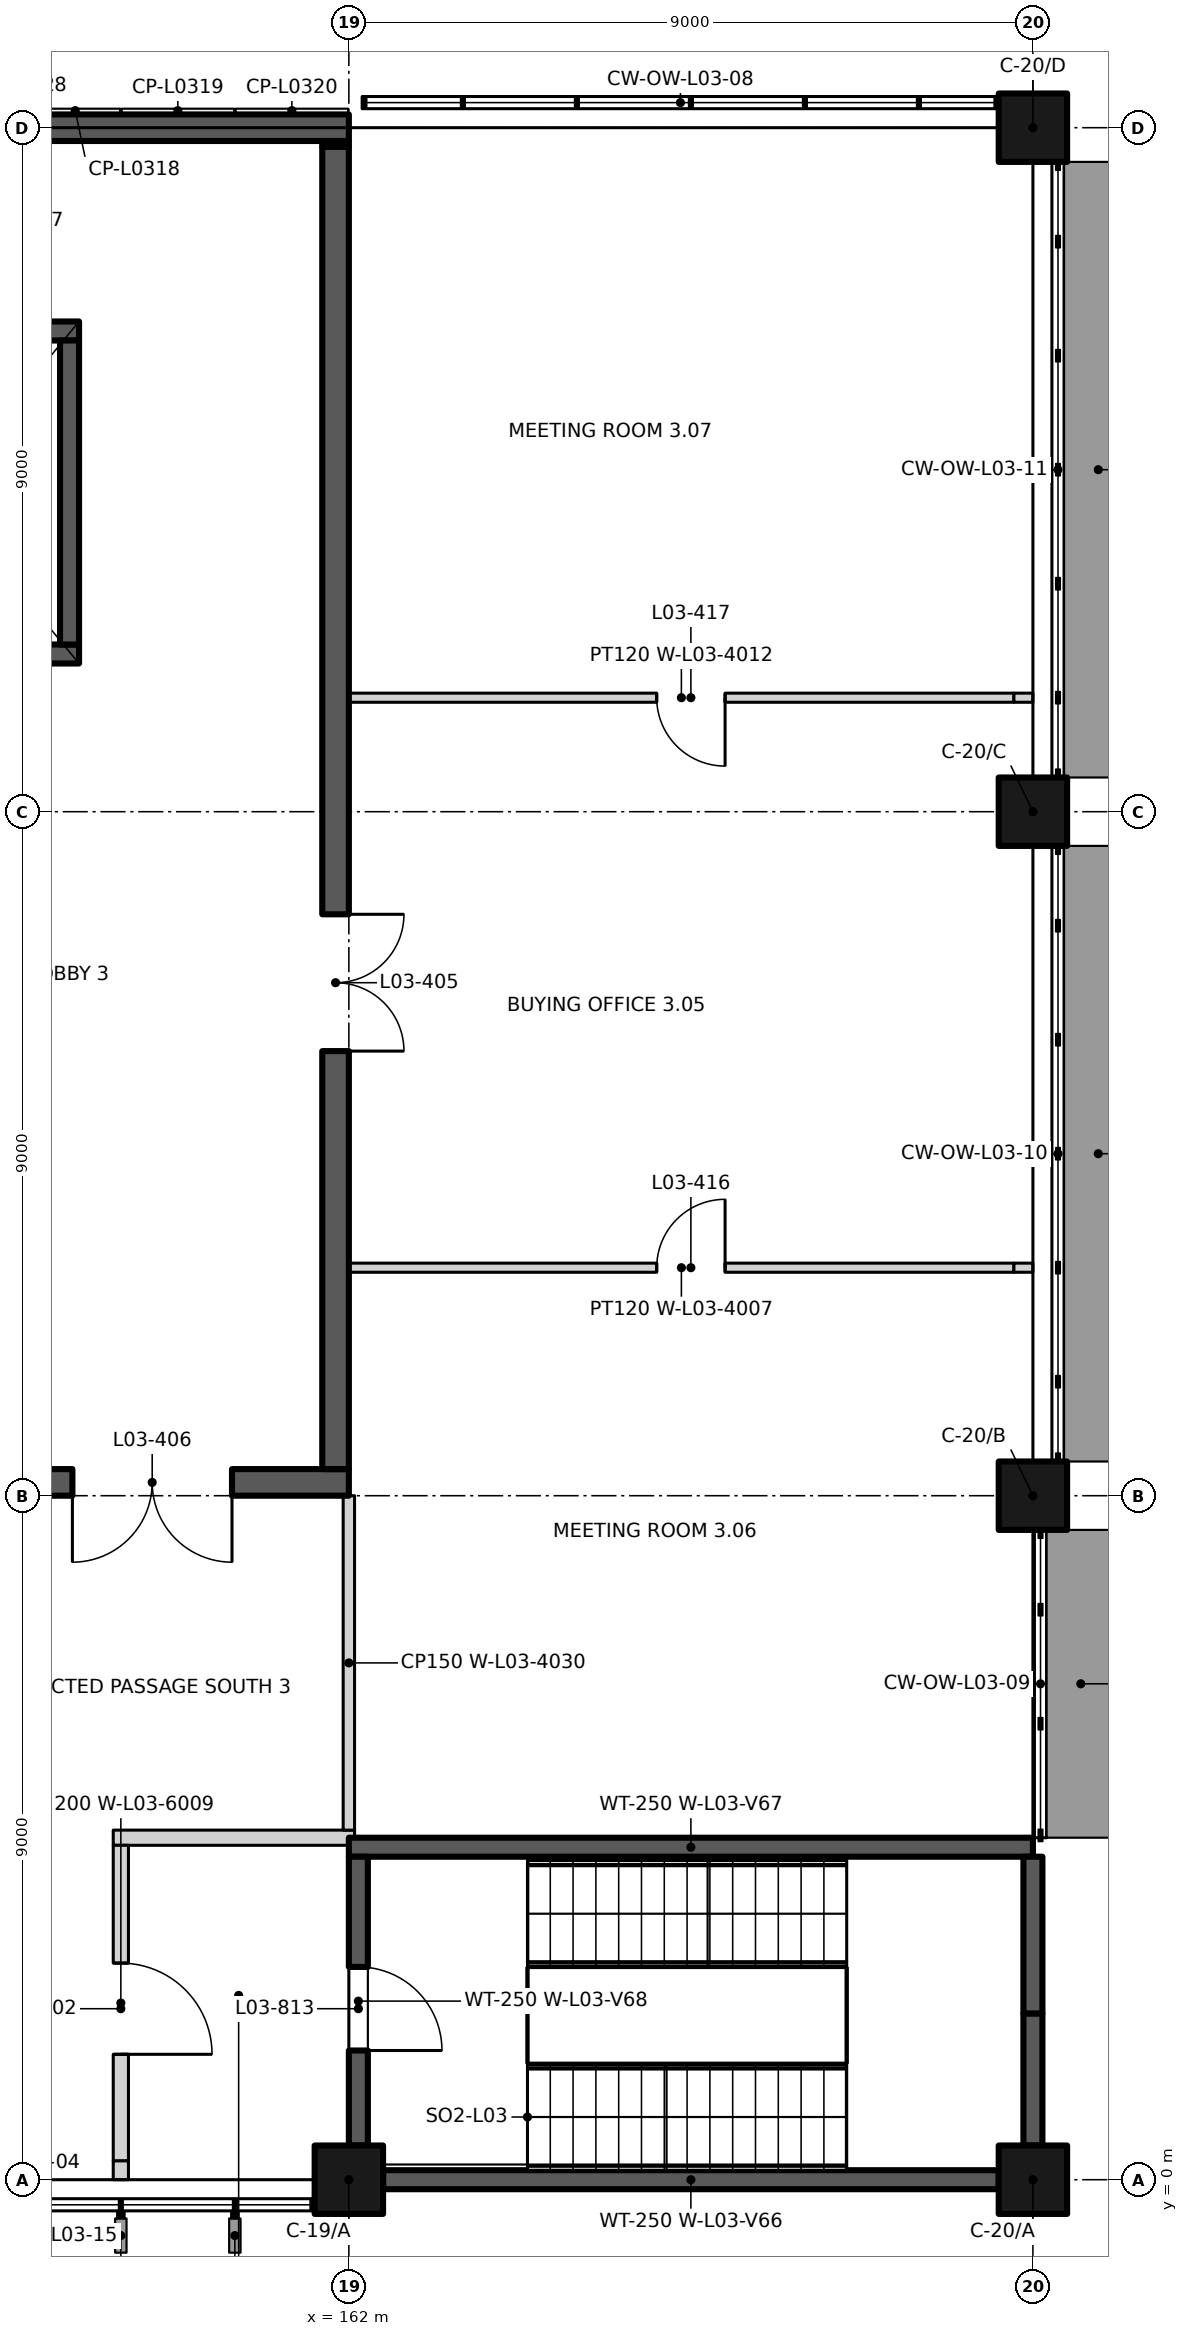
"""IFC4 building model, lengths in metres.
Left out: names, types, materials, properties, quantities, classifications, styles, units other than length and angle.
Written with IfcOpenShell. Run it as: python <this file> out.ifc"""

import sys

from ifc_helpers import new_model, si_unit, direction, frame, frame_2d, origin, origin_2d, place, context, subcontext, project, spatial, rectangle, extrude, element, fill, save


model = new_model("IFC4")
c1 = context("Model", 3, precision=1e-05, world=origin(), true_north=direction((0.0, 1.0)))
c2 = subcontext(c1, "Body", "Model", "MODEL_VIEW")
j1 = project(units=[si_unit("LENGTHUNIT", "METRE"), si_unit("PLANEANGLEUNIT", "RADIAN")], contexts=[c1])
p1 = place(None, origin())
s1 = spatial("IfcSite", under=j1, at=p1, CompositionType="ELEMENT")
p2 = place(p1, origin())
s2 = spatial("IfcBuilding", under=s1, at=p2, CompositionType="ELEMENT")
p3 = place(p2, frame((0.0, 0.0, 15.0)))
s3 = spatial("IfcBuildingStorey", under=s2, at=p3, CompositionType="ELEMENT", Elevation=15.0)
for number, where, z_axis, x_axis in (
    (1, (162.0, 0.0, 0.0), (0.0, 0.0, 1.0), (1.0, 0.0, 0.0)),
    (2, (171.0, 0.0, 0.0), (0.0, 0.0, 1.0), (1.0, 0.0, 0.0)),
    (3, (171.0, 9.0, 0.0), (0.0, 0.0, 1.0), (1.0, 0.0, 0.0)),
    (4, (171.0, 18.0, 0.0), (0.0, 0.0, 1.0), (1.0, 0.0, 0.0)),
    (5, (171.0, 27.0, 0.0), (0.0, 0.0, 1.0), (1.0, 0.0, 0.0)),
):
    element("IfcColumn", number, at=place(p3, frame(where, z_axis=z_axis, x_axis=x_axis)), inside=s3, PredefinedType="COLUMN", context=c2, shape_type="SweptSolid", body=[
        extrude(rectangle(XDim=0.9, YDim=0.9, at=origin_2d()), origin(), (0.0, 0.0, 1.0), 4.5),
    ])
p4 = place(p3, frame((162.45, 0.0, 0.0), z_axis=(0.0, 0.0, 1.0), x_axis=(1.0, 0.0, 0.0)))
e6 = element("IfcWall", 6, at=p4, inside=s3, PredefinedType="SHEAR", context=c2, shape_type="SweptSolid", body=[
    extrude(rectangle(XDim=8.1, YDim=0.25, at=frame_2d((4.05, 0.0))), origin(), (0.0, 0.0, 1.0), 4.5),
])
p5 = place(p3, frame((162.0, 4.375, 0.0), z_axis=(0.0, 0.0, 1.0), x_axis=(1.0, 0.0, 0.0)))
e7 = element("IfcWall", 7, at=p5, inside=s3, PredefinedType="SHEAR", context=c2, shape_type="SweptSolid", body=[
    extrude(rectangle(XDim=9.0, YDim=0.25, at=frame_2d((4.5, 0.0))), origin(), (0.0, 0.0, 1.0), 4.5),
])
p6 = place(p3, frame((162.125, 0.45, 0.0), z_axis=(0.0, 0.0, 1.0), x_axis=(0.0, 1.0, 0.0)))
e8 = element("IfcWall", 8, at=p6, inside=s3, PredefinedType="SHEAR", context=c2, shape_type="SweptSolid", body=[
    extrude(rectangle(XDim=3.8, YDim=0.25, at=frame_2d((1.9, 0.0))), origin(), (0.0, 0.0, 1.0), 4.5),
])
p7 = place(p6, frame((2.35, 0.0, 0.0), z_axis=(0.0, 0.0, 1.0), x_axis=(-1.0, 0.0, 0.0)))
e9 = element("IfcOpeningElement", 9, at=p7, cuts=e8, PredefinedType="OPENING", context=c2, shape_type="SweptSolid", body=[
    extrude(rectangle(XDim=1.1, YDim=2.1, at=frame_2d((0.55, 1.05))), frame((0.0, 0.135, 0.0), z_axis=(0.0, -1.0, 0.0), x_axis=(1.0, 0.0, 0.0)), (0.0, 0.0, 1.0), 0.27),
])
p8 = place(p3, frame((171.0, 0.45, 0.0), z_axis=(0.0, 0.0, 1.0), x_axis=(0.0, 1.0, 0.0)))
e10 = element("IfcWall", 10, at=p8, inside=s3, PredefinedType="SHEAR", context=c2, shape_type="SweptSolid", body=[
    extrude(rectangle(XDim=1.738, YDim=0.25, at=frame_2d((0.869, 0.0))), origin(), (0.0, 0.0, 1.0), 4.5),
])
p9 = place(p3, frame((171.0, 2.188, 0.0), z_axis=(0.0, 0.0, 1.0), x_axis=(0.0, 1.0, 0.0)))
e11 = element("IfcWall", 11, at=p9, inside=s3, PredefinedType="SHEAR", context=c2, shape_type="SweptSolid", body=[
    extrude(rectangle(XDim=2.062, YDim=0.25, at=frame_2d((1.031, 0.0))), origin(), (0.0, 0.0, 1.0), 4.5),
])
p10 = place(p3, frame((154.75, 20.075, 0.0), z_axis=(0.0, 0.0, 1.0), x_axis=(1.0, 0.0, 0.0)))
e12 = element("IfcWall", 12, at=p10, inside=s3, PredefinedType="SHEAR", context=c2, shape_type="SweptSolid", body=[
    extrude(rectangle(XDim=3.7, YDim=0.25, at=frame_2d((1.85, 0.0))), origin(), (0.0, 0.0, 1.0), 4.5),
])
p11 = place(p10, frame((1.15, 0.0, 0.0)))
e13 = element("IfcOpeningElement", 13, at=p11, cuts=e12, PredefinedType="OPENING", context=c2, shape_type="SweptSolid", body=[
    extrude(rectangle(XDim=1.4, YDim=2.1, at=frame_2d((0.7, 1.05))), frame((0.0, 0.135, 0.0), z_axis=(0.0, -1.0, 0.0), x_axis=(1.0, 0.0, 0.0)), (0.0, 0.0, 1.0), 0.27),
])
p12 = place(p3, frame((154.75, 24.325, 0.0), z_axis=(0.0, 0.0, 1.0), x_axis=(1.0, 0.0, 0.0)))
e14 = element("IfcWall", 14, at=p12, inside=s3, PredefinedType="SHEAR", context=c2, shape_type="SweptSolid", body=[
    extrude(rectangle(XDim=3.7, YDim=0.25, at=frame_2d((1.85, 0.0))), origin(), (0.0, 0.0, 1.0), 4.5),
])
p13 = place(p3, frame((158.325, 20.2, 0.0), z_axis=(0.0, 0.0, 1.0), x_axis=(0.0, 1.0, 0.0)))
e15 = element("IfcWall", 15, at=p13, inside=s3, PredefinedType="SHEAR", context=c2, shape_type="SweptSolid", body=[
    extrude(rectangle(XDim=4.0, YDim=0.25, at=frame_2d((2.0, 0.0))), origin(), (0.0, 0.0, 1.0), 4.5),
])
p14 = place(p3, frame((144.0, 27.0, 0.0), z_axis=(0.0, 0.0, 1.0), x_axis=(1.0, 0.0, 0.0)))
e16 = element("IfcWall", 16, at=p14, inside=s3, PredefinedType="SOLIDWALL", context=c2, shape_type="SweptSolid", body=[
    extrude(rectangle(XDim=18.0, YDim=0.35, at=frame_2d((9.0, 0.0))), origin(), (0.0, 0.0, 1.0), 3.6),
])
p15 = place(p14, frame((4.2, 0.0, 0.6)))
e17 = element("IfcOpeningElement", 17, at=p15, cuts=e16, PredefinedType="OPENING", context=c2, shape_type="SweptSolid", body=[
    extrude(rectangle(XDim=0.6, YDim=2.4, at=frame_2d((0.3, 1.2))), frame((0.0, 0.185, 0.0), z_axis=(0.0, -1.0, 0.0), x_axis=(1.0, 0.0, 0.0)), (0.0, 0.0, 1.0), 0.37),
])
p16 = place(p14, frame((13.2, 0.0, 0.6)))
e18 = element("IfcOpeningElement", 18, at=p16, cuts=e16, PredefinedType="OPENING", context=c2, shape_type="SweptSolid", body=[
    extrude(rectangle(XDim=0.6, YDim=2.4, at=frame_2d((0.3, 1.2))), frame((0.0, 0.185, 0.0), z_axis=(0.0, -1.0, 0.0), x_axis=(1.0, 0.0, 0.0)), (0.0, 0.0, 1.0), 0.37),
])
p17 = place(p3, frame((158.9, 4.5, 0.0), z_axis=(0.0, 0.0, 1.0), x_axis=(1.0, 0.0, 0.0)))
e19 = element("IfcWall", 19, at=p17, inside=s3, PredefinedType="PARTITIONING", context=c2, shape_type="SweptSolid", body=[
    extrude(rectangle(XDim=3.175, YDim=0.2, at=frame_2d((1.587, 0.0))), origin(), (0.0, 0.0, 1.0), 4.2),
])
p18 = place(p3, frame((144.0, 9.175, 0.0), z_axis=(0.0, 0.0, 1.0), x_axis=(1.0, 0.0, 0.0)))
e20 = element("IfcWall", 20, at=p18, inside=s3, PredefinedType="SHEAR", context=c2, shape_type="SweptSolid", body=[
    extrude(rectangle(XDim=18.0, YDim=0.35, at=frame_2d((9.0, 0.0))), origin(), (0.0, 0.0, 1.0), 4.2),
])
p19 = place(p18, frame((16.463, 0.0, 0.0), z_axis=(0.0, 0.0, 1.0), x_axis=(-1.0, 0.0, 0.0)))
e21 = element("IfcOpeningElement", 21, at=p19, cuts=e20, PredefinedType="OPENING", context=c2, shape_type="SweptSolid", body=[
    extrude(rectangle(XDim=2.1, YDim=2.4, at=frame_2d((1.05, 1.2))), frame((0.0, 0.185, 0.0), z_axis=(0.0, -1.0, 0.0), x_axis=(1.0, 0.0, 0.0)), (0.0, 0.0, 1.0), 0.37),
])
p20 = place(p3, frame((162.0, 12.0, 0.0), z_axis=(0.0, 0.0, 1.0), x_axis=(1.0, 0.0, 0.0)))
e22 = element("IfcWall", 22, at=p20, inside=s3, PredefinedType="PARTITIONING", context=c2, shape_type="SweptSolid", body=[
    extrude(rectangle(XDim=8.75, YDim=0.12, at=frame_2d((4.375, 0.0))), origin(), (0.0, 0.0, 1.0), 4.2),
])
p21 = place(p20, frame((4.05, 0.0, 0.0)))
e23 = element("IfcOpeningElement", 23, at=p21, cuts=e22, PredefinedType="OPENING", context=c2, shape_type="SweptSolid", body=[
    extrude(rectangle(XDim=0.9, YDim=2.1, at=frame_2d((0.45, 1.05))), frame((0.0, 0.07, 0.0), z_axis=(0.0, -1.0, 0.0), x_axis=(1.0, 0.0, 0.0)), (0.0, 0.0, 1.0), 0.14),
])
p22 = place(p3, frame((170.75, 12.0, 0.0), z_axis=(0.0, 0.0, 1.0), x_axis=(1.0, 0.0, 0.0)))
e24 = element("IfcWall", 24, at=p22, inside=s3, PredefinedType="PARTITIONING", context=c2, shape_type="SweptSolid", body=[
    extrude(rectangle(XDim=0.25, YDim=0.12, at=frame_2d((0.125, 0.0))), origin(), (0.0, 0.0, 1.0), 3.6),
])
p23 = place(p3, frame((162.0, 19.5, 0.0), z_axis=(0.0, 0.0, 1.0), x_axis=(1.0, 0.0, 0.0)))
e25 = element("IfcWall", 25, at=p23, inside=s3, PredefinedType="PARTITIONING", context=c2, shape_type="SweptSolid", body=[
    extrude(rectangle(XDim=8.75, YDim=0.12, at=frame_2d((4.375, 0.0))), origin(), (0.0, 0.0, 1.0), 4.2),
])
p24 = place(p23, frame((4.95, 0.0, 0.0), z_axis=(0.0, 0.0, 1.0), x_axis=(-1.0, 0.0, 0.0)))
e26 = element("IfcOpeningElement", 26, at=p24, cuts=e25, PredefinedType="OPENING", context=c2, shape_type="SweptSolid", body=[
    extrude(rectangle(XDim=0.9, YDim=2.1, at=frame_2d((0.45, 1.05))), frame((0.0, 0.07, 0.0), z_axis=(0.0, -1.0, 0.0), x_axis=(1.0, 0.0, 0.0)), (0.0, 0.0, 1.0), 0.14),
])
p25 = place(p3, frame((170.75, 19.5, 0.0), z_axis=(0.0, 0.0, 1.0), x_axis=(1.0, 0.0, 0.0)))
e27 = element("IfcWall", 27, at=p25, inside=s3, PredefinedType="PARTITIONING", context=c2, shape_type="SweptSolid", body=[
    extrude(rectangle(XDim=0.25, YDim=0.12, at=frame_2d((0.125, 0.0))), origin(), (0.0, 0.0, 1.0), 3.6),
])
p26 = place(p3, frame((159.0, 0.0, 0.0), z_axis=(0.0, 0.0, 1.0), x_axis=(0.0, 1.0, 0.0)))
e28 = element("IfcWall", 28, at=p26, inside=s3, PredefinedType="PARTITIONING", context=c2, shape_type="SweptSolid", body=[
    extrude(rectangle(XDim=0.25, YDim=0.2, at=frame_2d((0.125, 0.0))), origin(), (0.0, 0.0, 1.0), 3.6),
])
p27 = place(p3, frame((159.0, 0.25, 0.0), z_axis=(0.0, 0.0, 1.0), x_axis=(0.0, 1.0, 0.0)))
e29 = element("IfcWall", 29, at=p27, inside=s3, PredefinedType="PARTITIONING", context=c2, shape_type="SweptSolid", body=[
    extrude(rectangle(XDim=4.15, YDim=0.2, at=frame_2d((2.075, 0.0))), origin(), (0.0, 0.0, 1.0), 4.2),
])
p28 = place(p27, frame((2.6, 0.0, 0.0), z_axis=(0.0, 0.0, 1.0), x_axis=(-1.0, 0.0, 0.0)))
e30 = element("IfcOpeningElement", 30, at=p28, cuts=e29, PredefinedType="OPENING", context=c2, shape_type="SweptSolid", body=[
    extrude(rectangle(XDim=1.2, YDim=2.1, at=frame_2d((0.6, 1.05))), frame((0.0, 0.11, 0.0), z_axis=(0.0, -1.0, 0.0), x_axis=(1.0, 0.0, 0.0)), (0.0, 0.0, 1.0), 0.22),
])
p29 = place(p3, frame((161.825, 9.35, 0.0), z_axis=(0.0, 0.0, 1.0), x_axis=(0.0, 1.0, 0.0)))
e31 = element("IfcWall", 31, at=p29, inside=s3, PredefinedType="SHEAR", context=c2, shape_type="SweptSolid", body=[
    extrude(rectangle(XDim=17.4, YDim=0.35, at=frame_2d((8.7, 0.0))), origin(), (0.0, 0.0, 1.0), 4.2),
])
p30 = place(p29, frame((7.3, 0.0, 0.0), z_axis=(0.0, 0.0, 1.0), x_axis=(-1.0, 0.0, 0.0)))
e32 = element("IfcOpeningElement", 32, at=p30, cuts=e31, PredefinedType="OPENING", context=c2, shape_type="SweptSolid", body=[
    extrude(rectangle(XDim=1.8, YDim=2.4, at=frame_2d((0.9, 1.2))), frame((0.0, 0.185, 0.0), z_axis=(0.0, -1.0, 0.0), x_axis=(1.0, 0.0, 0.0)), (0.0, 0.0, 1.0), 0.37),
])
p31 = place(p3, frame((161.825, 26.75, 0.0), z_axis=(0.0, 0.0, 1.0), x_axis=(0.0, 1.0, 0.0)))
e33 = element("IfcWall", 33, at=p31, inside=s3, PredefinedType="SHEAR", context=c2, shape_type="SweptSolid", body=[
    extrude(rectangle(XDim=0.075, YDim=0.35, at=frame_2d((0.038, 0.0))), origin(), (0.0, 0.0, 1.0), 3.6),
])
p32 = place(p3, frame((162.0, 4.6, 0.0), z_axis=(0.0, 0.0, 1.0), x_axis=(0.0, 1.0, 0.0)))
e34 = element("IfcWall", 34, at=p32, inside=s3, PredefinedType="PARTITIONING", context=c2, shape_type="SweptSolid", body=[
    extrude(rectangle(XDim=4.4, YDim=0.15, at=frame_2d((2.2, 0.0))), origin(), (0.0, 0.0, 1.0), 4.2),
])
p33 = place(p7, origin())
e35 = element("IfcDoor", 35, at=p33, inside=s3, OperationType="SINGLE_SWING_RIGHT", PredefinedType="DOOR", context=c2, shape_type="SweptSolid", body=[
    extrude(rectangle(XDim=1.1, YDim=2.1, at=frame_2d((0.55, 1.05))), frame((0.0, 0.025, 0.0), z_axis=(0.0, -1.0, 0.0), x_axis=(1.0, 0.0, 0.0)), (0.0, 0.0, 1.0), 0.05),
])
fill(e9, e35)
p34 = place(p28, origin())
e36 = element("IfcDoor", 36, at=p34, inside=s3, OperationType="SINGLE_SWING_RIGHT", PredefinedType="DOOR", context=c2, shape_type="SweptSolid", body=[
    extrude(rectangle(XDim=1.2, YDim=2.1, at=frame_2d((0.6, 1.05))), frame((0.0, 0.025, 0.0), z_axis=(0.0, -1.0, 0.0), x_axis=(1.0, 0.0, 0.0)), (0.0, 0.0, 1.0), 0.05),
])
fill(e30, e36)
p35 = place(p30, origin())
e37 = element("IfcDoor", 37, at=p35, inside=s3, OperationType="DOUBLE_DOOR_SINGLE_SWING", PredefinedType="DOOR", context=c2, shape_type="SweptSolid", body=[
    extrude(rectangle(XDim=1.8, YDim=2.4, at=frame_2d((0.9, 1.2))), frame((0.0, 0.025, 0.0), z_axis=(0.0, -1.0, 0.0), x_axis=(1.0, 0.0, 0.0)), (0.0, 0.0, 1.0), 0.05),
])
fill(e32, e37)
p36 = place(p19, origin())
e38 = element("IfcDoor", 38, at=p36, inside=s3, OperationType="DOUBLE_DOOR_SINGLE_SWING", PredefinedType="DOOR", context=c2, shape_type="SweptSolid", body=[
    extrude(rectangle(XDim=2.1, YDim=2.4, at=frame_2d((1.05, 1.2))), frame((0.0, 0.025, 0.0), z_axis=(0.0, -1.0, 0.0), x_axis=(1.0, 0.0, 0.0)), (0.0, 0.0, 1.0), 0.05),
])
fill(e21, e38)
p37 = place(p21, origin())
e39 = element("IfcDoor", 39, at=p37, inside=s3, OperationType="SINGLE_SWING_RIGHT", PredefinedType="DOOR", context=c2, shape_type="SweptSolid", body=[
    extrude(rectangle(XDim=0.9, YDim=2.1, at=frame_2d((0.45, 1.05))), frame((0.0, 0.025, 0.0), z_axis=(0.0, -1.0, 0.0), x_axis=(1.0, 0.0, 0.0)), (0.0, 0.0, 1.0), 0.05),
])
fill(e23, e39)
p38 = place(p24, origin())
e40 = element("IfcDoor", 40, at=p38, inside=s3, OperationType="SINGLE_SWING_LEFT", PredefinedType="DOOR", context=c2, shape_type="SweptSolid", body=[
    extrude(rectangle(XDim=0.9, YDim=2.1, at=frame_2d((0.45, 1.05))), frame((0.0, 0.025, 0.0), z_axis=(0.0, -1.0, 0.0), x_axis=(1.0, 0.0, 0.0)), (0.0, 0.0, 1.0), 0.05),
])
fill(e26, e40)
save(model, sys.argv[1])
